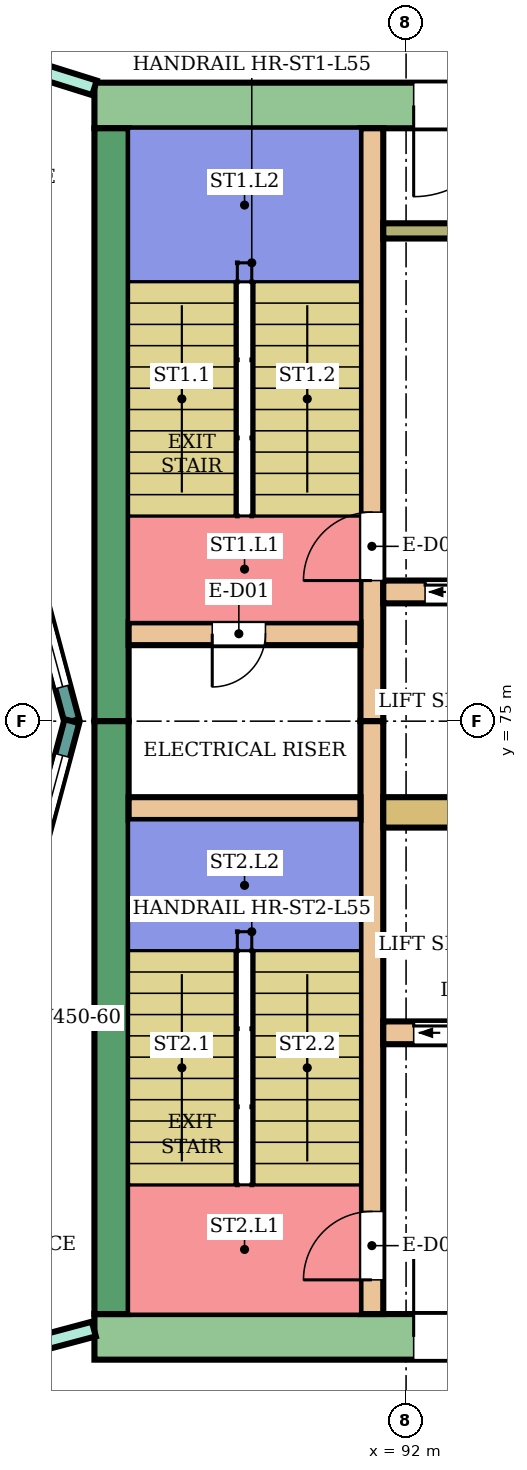
"""IFC4 building model, lengths in metres.
Left out: names, types, materials, properties, quantities, classifications, styles, units other than length and angle.
Written with IfcOpenShell. Run it as: python <this file> out.ifc"""

import sys

from ifc_helpers import new_model, si_unit, direction, frame, frame_2d, origin, place, context, subcontext, project, spatial, rectangle, extrude, element, fill, save


model = new_model("IFC4")
c1 = context("Model", 3, precision=1e-05, world=origin(), true_north=direction((0.0, 1.0)))
c2 = subcontext(c1, "Body", "Model", "MODEL_VIEW")
j1 = project(units=[si_unit("LENGTHUNIT", "METRE"), si_unit("PLANEANGLEUNIT", "RADIAN")], contexts=[c1])
p1 = place(None, origin())
s1 = spatial("IfcSite", under=j1, at=p1, CompositionType="ELEMENT")
p2 = place(p1, origin())
s2 = spatial("IfcBuilding", under=s1, at=p2, CompositionType="ELEMENT")
p3 = place(p2, frame((0.0, 0.0, 241.5)))
s3 = spatial("IfcBuildingStorey", under=s2, at=p3, CompositionType="ELEMENT", Elevation=241.5)
p4 = place(p3, frame((87.9, 83.1, 0.0), z_axis=(0.0, 0.0, 1.0), x_axis=(1.0, 0.0, 0.0)))
e1 = element("IfcWall", 1, at=p4, inside=s3, PredefinedType="SHEAR", context=c2, shape_type="SweptSolid", body=[
    extrude(rectangle(XDim=14.9, YDim=0.6, at=frame_2d((7.45, 0.0))), origin(), (0.0, 0.0, 1.0), 3.88),
])
p5 = place(p4, frame((4.2, 0.0, 0.0)))
e2 = element("IfcOpeningElement", 2, at=p5, cuts=e1, PredefinedType="OPENING", context=c2, shape_type="SweptSolid", body=[
    extrude(rectangle(XDim=2.4, YDim=2.4, at=frame_2d((1.2, 1.2))), frame((0.0, 0.31, 0.0), z_axis=(0.0, -1.0, 0.0), x_axis=(1.0, 0.0, 0.0)), (0.0, 0.0, 1.0), 0.62),
])
p6 = place(p3, frame((87.9, 66.9, 0.0), z_axis=(0.0, 0.0, 1.0), x_axis=(1.0, 0.0, 0.0)))
e3 = element("IfcWall", 3, at=p6, inside=s3, PredefinedType="SHEAR", context=c2, shape_type="SweptSolid", body=[
    extrude(rectangle(XDim=14.9, YDim=0.6, at=frame_2d((7.45, 0.0))), origin(), (0.0, 0.0, 1.0), 3.88),
])
p7 = place(p6, frame((4.2, 0.0, 0.0)))
e4 = element("IfcOpeningElement", 4, at=p7, cuts=e3, PredefinedType="OPENING", context=c2, shape_type="SweptSolid", body=[
    extrude(rectangle(XDim=2.4, YDim=2.4, at=frame_2d((1.2, 1.2))), frame((0.0, 0.31, 0.0), z_axis=(0.0, -1.0, 0.0), x_axis=(1.0, 0.0, 0.0)), (0.0, 0.0, 1.0), 0.62),
])
for number, where, z_axis, x_axis in (
    (5, (88.125, 75.0, 0.0), (0.0, 0.0, 1.0), (0.0, 1.0, 0.0)),
    (6, (88.125, 67.2, 0.0), (0.0, 0.0, 1.0), (0.0, 1.0, 0.0)),
):
    element("IfcWall", number, at=place(p3, frame(where, z_axis=z_axis, x_axis=x_axis)), inside=s3, PredefinedType="SHEAR", context=c2, shape_type="SweptSolid", body=[
        extrude(rectangle(XDim=7.8, YDim=0.45, at=frame_2d((3.9, 0.0))), origin(), (0.0, 0.0, 1.0), 3.88),
    ])
p8 = place(p3, frame((91.55, 75.0, 0.0), z_axis=(0.0, 0.0, 1.0), x_axis=(0.0, 1.0, 0.0)))
e7 = element("IfcWall", 7, at=p8, inside=s3, PredefinedType="SHEAR", context=c2, shape_type="SweptSolid", body=[
    extrude(rectangle(XDim=7.8, YDim=0.3, at=frame_2d((3.9, 0.0))), origin(), (0.0, 0.0, 1.0), 3.88),
])
p9 = place(p8, frame((1.85, 0.0, 0.0)))
e8 = element("IfcOpeningElement", 8, at=p9, cuts=e7, PredefinedType="OPENING", context=c2, shape_type="SweptSolid", body=[
    extrude(rectangle(XDim=0.9, YDim=2.1, at=frame_2d((0.45, 1.05))), frame((0.0, 0.16, 0.0), z_axis=(0.0, -1.0, 0.0), x_axis=(1.0, 0.0, 0.0)), (0.0, 0.0, 1.0), 0.32),
])
p10 = place(p3, frame((91.55, 67.2, 0.0), z_axis=(0.0, 0.0, 1.0), x_axis=(0.0, 1.0, 0.0)))
e9 = element("IfcWall", 9, at=p10, inside=s3, PredefinedType="SHEAR", context=c2, shape_type="SweptSolid", body=[
    extrude(rectangle(XDim=7.8, YDim=0.3, at=frame_2d((3.9, 0.0))), origin(), (0.0, 0.0, 1.0), 3.88),
])
p11 = place(p10, frame((0.45, 0.0, 0.0)))
e10 = element("IfcOpeningElement", 10, at=p11, cuts=e9, PredefinedType="OPENING", context=c2, shape_type="SweptSolid", body=[
    extrude(rectangle(XDim=0.9, YDim=2.1, at=frame_2d((0.45, 1.05))), frame((0.0, 0.16, 0.0), z_axis=(0.0, -1.0, 0.0), x_axis=(1.0, 0.0, 0.0)), (0.0, 0.0, 1.0), 0.32),
])
p12 = place(p3, frame((88.35, 76.15, 0.0), z_axis=(0.0, 0.0, 1.0), x_axis=(1.0, 0.0, 0.0)))
e11 = element("IfcWall", 11, at=p12, inside=s3, PredefinedType="SHEAR", context=c2, shape_type="SweptSolid", body=[
    extrude(rectangle(XDim=3.05, YDim=0.3, at=frame_2d((1.525, 0.0))), origin(), (0.0, 0.0, 1.0), 3.88),
])
p13 = place(p12, frame((1.1, 0.0, 0.0)))
e12 = element("IfcOpeningElement", 12, at=p13, cuts=e11, PredefinedType="OPENING", context=c2, shape_type="SweptSolid", body=[
    extrude(rectangle(XDim=0.7, YDim=2.0, at=frame_2d((0.35, 1.0))), frame((0.0, 0.16, 0.0), z_axis=(0.0, -1.0, 0.0), x_axis=(1.0, 0.0, 0.0)), (0.0, 0.0, 1.0), 0.32),
])
p14 = place(p3, frame((88.35, 73.85, 0.0), z_axis=(0.0, 0.0, 1.0), x_axis=(1.0, 0.0, 0.0)))
e13 = element("IfcWall", 13, at=p14, inside=s3, PredefinedType="SHEAR", context=c2, shape_type="SweptSolid", body=[
    extrude(rectangle(XDim=3.05, YDim=0.3, at=frame_2d((1.525, 0.0))), origin(), (0.0, 0.0, 1.0), 3.88),
])
p15 = place(p3, frame((91.7, 76.7, 0.0), z_axis=(0.0, 0.0, 1.0), x_axis=(1.0, 0.0, 0.0)))
e14 = element("IfcWall", 14, at=p15, inside=s3, PredefinedType="SHEAR", context=c2, shape_type="SweptSolid", body=[
    extrude(rectangle(XDim=11.1, YDim=0.3, at=frame_2d((5.55, 0.0))), origin(), (0.0, 0.0, 1.0), 3.88),
])
p16 = place(p15, frame((0.55, 0.0, 0.0)))
e15 = element("IfcOpeningElement", 15, at=p16, cuts=e14, PredefinedType="OPENING", context=c2, shape_type="SweptSolid", body=[
    extrude(rectangle(XDim=1.1, YDim=2.1, at=frame_2d((0.55, 1.05))), frame((0.0, 0.16, 0.0), z_axis=(0.0, -1.0, 0.0), x_axis=(1.0, 0.0, 0.0)), (0.0, 0.0, 1.0), 0.32),
])
p17 = place(p15, frame((3.0, 0.0, 0.0)))
e16 = element("IfcOpeningElement", 16, at=p17, cuts=e14, PredefinedType="OPENING", context=c2, shape_type="SweptSolid", body=[
    extrude(rectangle(XDim=1.2, YDim=2.1, at=frame_2d((0.6, 1.05))), frame((0.0, 0.16, 0.0), z_axis=(0.0, -1.0, 0.0), x_axis=(1.0, 0.0, 0.0)), (0.0, 0.0, 1.0), 0.32),
])
p18 = place(p15, frame((5.5, 0.0, 0.0)))
e17 = element("IfcOpeningElement", 17, at=p18, cuts=e14, PredefinedType="OPENING", context=c2, shape_type="SweptSolid", body=[
    extrude(rectangle(XDim=1.2, YDim=2.1, at=frame_2d((0.6, 1.05))), frame((0.0, 0.16, 0.0), z_axis=(0.0, -1.0, 0.0), x_axis=(1.0, 0.0, 0.0)), (0.0, 0.0, 1.0), 0.32),
])
p19 = place(p15, frame((7.95, 0.0, 0.0)))
e18 = element("IfcOpeningElement", 18, at=p19, cuts=e14, PredefinedType="OPENING", context=c2, shape_type="SweptSolid", body=[
    extrude(rectangle(XDim=0.9, YDim=2.1, at=frame_2d((0.45, 1.05))), frame((0.0, 0.16, 0.0), z_axis=(0.0, -1.0, 0.0), x_axis=(1.0, 0.0, 0.0)), (0.0, 0.0, 1.0), 0.32),
])
p20 = place(p15, frame((9.75, 0.0, 0.0)))
e19 = element("IfcOpeningElement", 19, at=p20, cuts=e14, PredefinedType="OPENING", context=c2, shape_type="SweptSolid", body=[
    extrude(rectangle(XDim=0.9, YDim=2.1, at=frame_2d((0.45, 1.05))), frame((0.0, 0.16, 0.0), z_axis=(0.0, -1.0, 0.0), x_axis=(1.0, 0.0, 0.0)), (0.0, 0.0, 1.0), 0.32),
])
p21 = place(p3, frame((91.7, 73.8, 0.0), z_axis=(0.0, 0.0, 1.0), x_axis=(1.0, 0.0, 0.0)))
e20 = element("IfcWall", 20, at=p21, inside=s3, PredefinedType="SHEAR", context=c2, shape_type="SweptSolid", body=[
    extrude(rectangle(XDim=11.1, YDim=0.4, at=frame_2d((5.55, 0.0))), origin(), (0.0, 0.0, 1.0), 3.88),
])
p22 = place(p3, frame((91.7, 70.9, 0.0), z_axis=(0.0, 0.0, 1.0), x_axis=(1.0, 0.0, 0.0)))
e21 = element("IfcWall", 21, at=p22, inside=s3, PredefinedType="SHEAR", context=c2, shape_type="SweptSolid", body=[
    extrude(rectangle(XDim=11.1, YDim=0.3, at=frame_2d((5.55, 0.0))), origin(), (0.0, 0.0, 1.0), 3.88),
])
p23 = place(p22, frame((0.4, 0.0, 0.0)))
e22 = element("IfcOpeningElement", 22, at=p23, cuts=e21, PredefinedType="OPENING", context=c2, shape_type="SweptSolid", body=[
    extrude(rectangle(XDim=1.4, YDim=2.1, at=frame_2d((0.7, 1.05))), frame((0.0, 0.16, 0.0), z_axis=(0.0, -1.0, 0.0), x_axis=(1.0, 0.0, 0.0)), (0.0, 0.0, 1.0), 0.32),
])
p24 = place(p22, frame((3.0, 0.0, 0.0)))
e23 = element("IfcOpeningElement", 23, at=p24, cuts=e21, PredefinedType="OPENING", context=c2, shape_type="SweptSolid", body=[
    extrude(rectangle(XDim=1.2, YDim=2.1, at=frame_2d((0.6, 1.05))), frame((0.0, 0.16, 0.0), z_axis=(0.0, -1.0, 0.0), x_axis=(1.0, 0.0, 0.0)), (0.0, 0.0, 1.0), 0.32),
])
p25 = place(p22, frame((6.075, 0.0, 0.0)))
e24 = element("IfcOpeningElement", 24, at=p25, cuts=e21, PredefinedType="OPENING", context=c2, shape_type="SweptSolid", body=[
    extrude(rectangle(XDim=0.9, YDim=2.1, at=frame_2d((0.45, 1.05))), frame((0.0, 0.16, 0.0), z_axis=(0.0, -1.0, 0.0), x_axis=(1.0, 0.0, 0.0)), (0.0, 0.0, 1.0), 0.32),
])
p26 = place(p22, frame((9.125, 0.0, 0.0)))
e25 = element("IfcOpeningElement", 25, at=p26, cuts=e21, PredefinedType="OPENING", context=c2, shape_type="SweptSolid", body=[
    extrude(rectangle(XDim=0.9, YDim=2.1, at=frame_2d((0.45, 1.05))), frame((0.0, 0.16, 0.0), z_axis=(0.0, -1.0, 0.0), x_axis=(1.0, 0.0, 0.0)), (0.0, 0.0, 1.0), 0.32),
])
p27 = place(p3, frame((91.7, 81.45, 0.0), z_axis=(0.0, 0.0, 1.0), x_axis=(1.0, 0.0, 0.0)))
e26 = element("IfcWall", 26, at=p27, inside=s3, PredefinedType="SHEAR", context=c2, shape_type="SweptSolid", body=[
    extrude(rectangle(XDim=4.35, YDim=0.2, at=frame_2d((2.175, 0.0))), origin(), (0.0, 0.0, 1.0), 3.88),
])
p28 = place(p3, frame((87.604, 75.0, 0.0), z_axis=(0.0, 0.0, 1.0), x_axis=(-0.258789828301, 0.965933654434, 0.0)))
e27 = element("IfcWall", 27, at=p28, inside=s3, PredefinedType="NOTDEFINED", context=c2, shape_type="SweptSolid", body=[
    extrude(rectangle(XDim=3.936, YDim=0.2, at=frame_2d((1.968, 0.0))), origin(), (0.0, 0.0, 1.0), 4.2),
])
p29 = place(p28, frame((0.468, 0.0, 0.9)))
e28 = element("IfcOpeningElement", 28, at=p29, cuts=e27, PredefinedType="OPENING", context=c2, shape_type="SweptSolid", body=[
    extrude(rectangle(XDim=3.0, YDim=2.3, at=frame_2d((1.5, 1.15))), frame((0.0, 0.11, 0.0), z_axis=(0.0, -1.0, 0.0), x_axis=(1.0, 0.0, 0.0)), (0.0, 0.0, 1.0), 0.22),
])
p30 = place(p3, frame((86.585, 71.198, 0.0), z_axis=(0.0, 0.0, 1.0), x_axis=(0.258789828301, 0.965933654434, 0.0)))
e29 = element("IfcWall", 29, at=p30, inside=s3, PredefinedType="NOTDEFINED", context=c2, shape_type="SweptSolid", body=[
    extrude(rectangle(XDim=3.936, YDim=0.2, at=frame_2d((1.968, 0.0))), origin(), (0.0, 0.0, 1.0), 4.2),
])
p31 = place(p30, frame((0.468, 0.0, 0.9)))
e30 = element("IfcOpeningElement", 30, at=p31, cuts=e29, PredefinedType="OPENING", context=c2, shape_type="SweptSolid", body=[
    extrude(rectangle(XDim=3.0, YDim=2.3, at=frame_2d((1.5, 1.15))), frame((0.0, 0.11, 0.0), z_axis=(0.0, -1.0, 0.0), x_axis=(1.0, 0.0, 0.0)), (0.0, 0.0, 1.0), 0.22),
])
p32 = place(p3, frame((80.125, 64.932, 0.0), z_axis=(0.0, 0.0, 1.0), x_axis=(0.966236955806, 0.257655089674, 0.0)))
e31 = element("IfcWall", 31, at=p32, inside=s3, PredefinedType="PARTITIONING", context=c2, shape_type="SweptSolid", body=[
    extrude(rectangle(XDim=8.039, YDim=0.2, at=frame_2d((4.02, 0.0))), origin(), (0.0, 0.0, 1.0), 3.75),
])
p33 = place(p32, frame((6.298, 0.0, 0.0)))
e32 = element("IfcOpeningElement", 32, at=p33, cuts=e31, PredefinedType="OPENING", context=c2, shape_type="SweptSolid", body=[
    extrude(rectangle(XDim=0.9, YDim=2.1, at=frame_2d((0.45, 1.05))), frame((0.0, 0.11, 0.0), z_axis=(0.0, -1.0, 0.0), x_axis=(1.0, 0.0, 0.0)), (0.0, 0.0, 1.0), 0.22),
])
p34 = place(p32, frame((2.045, 0.0, 0.0)))
e33 = element("IfcOpeningElement", 33, at=p34, cuts=e31, PredefinedType="OPENING", context=c2, shape_type="SweptSolid", body=[
    extrude(rectangle(XDim=0.9, YDim=2.1, at=frame_2d((0.45, 1.05))), frame((0.0, 0.11, 0.0), z_axis=(0.0, -1.0, 0.0), x_axis=(1.0, 0.0, 0.0)), (0.0, 0.0, 1.0), 0.22),
])
p35 = place(p3, frame((85.587, 84.057, 0.0), z_axis=(0.0, 0.0, 1.0), x_axis=(0.954239513179, -0.299043393987, 0.0)))
e34 = element("IfcWall", 34, at=p35, inside=s3, PredefinedType="PARTITIONING", context=c2, shape_type="SweptSolid", body=[
    extrude(rectangle(XDim=2.424, YDim=0.2, at=frame_2d((1.212, 0.0))), origin(), (0.0, 0.0, 1.0), 3.75),
])
p36 = place(p35, frame((0.762, 0.0, 0.0)))
e35 = element("IfcOpeningElement", 35, at=p36, cuts=e34, PredefinedType="OPENING", context=c2, shape_type="SweptSolid", body=[
    extrude(rectangle(XDim=0.9, YDim=2.1, at=frame_2d((0.45, 1.05))), frame((0.0, 0.11, 0.0), z_axis=(0.0, -1.0, 0.0), x_axis=(1.0, 0.0, 0.0)), (0.0, 0.0, 1.0), 0.22),
])
p37 = place(p29, origin())
e36 = element("IfcWindow", 36, at=p37, inside=s3, PartitioningType="SINGLE_PANEL", PredefinedType="WINDOW", context=c2, shape_type="SweptSolid", body=[
    extrude(rectangle(XDim=3.0, YDim=2.3, at=frame_2d((1.5, 1.15))), frame((0.0, 0.03, 0.0), z_axis=(0.0, -1.0, 0.0), x_axis=(1.0, 0.0, 0.0)), (0.0, 0.0, 1.0), 0.06),
])
fill(e28, e36)
p38 = place(p31, origin())
e37 = element("IfcWindow", 37, at=p38, inside=s3, PartitioningType="SINGLE_PANEL", PredefinedType="WINDOW", context=c2, shape_type="SweptSolid", body=[
    extrude(rectangle(XDim=3.0, YDim=2.3, at=frame_2d((1.5, 1.15))), frame((0.0, 0.03, 0.0), z_axis=(0.0, -1.0, 0.0), x_axis=(1.0, 0.0, 0.0)), (0.0, 0.0, 1.0), 0.06),
])
fill(e30, e37)
p39 = place(p13, frame((0.7, 0.0, 0.0), z_axis=(0.0, 0.0, 1.0), x_axis=(-1.0, 0.0, 0.0)))
e38 = element("IfcDoor", 38, at=p39, inside=s3, OperationType="SINGLE_SWING_RIGHT", PredefinedType="DOOR", context=c2, shape_type="SweptSolid", body=[
    extrude(rectangle(XDim=0.7, YDim=2.0, at=frame_2d((0.35, 1.0))), frame((0.0, 0.025, 0.0), z_axis=(0.0, -1.0, 0.0), x_axis=(1.0, 0.0, 0.0)), (0.0, 0.0, 1.0), 0.05),
])
fill(e12, e38)
p40 = place(p9, origin())
e39 = element("IfcDoor", 39, at=p40, inside=s3, OperationType="SINGLE_SWING_LEFT", PredefinedType="DOOR", context=c2, shape_type="SweptSolid", body=[
    extrude(rectangle(XDim=0.9, YDim=2.1, at=frame_2d((0.45, 1.05))), frame((0.0, 0.025, 0.0), z_axis=(0.0, -1.0, 0.0), x_axis=(1.0, 0.0, 0.0)), (0.0, 0.0, 1.0), 0.05),
])
fill(e8, e39)
p41 = place(p11, origin())
e40 = element("IfcDoor", 40, at=p41, inside=s3, OperationType="SINGLE_SWING_LEFT", PredefinedType="DOOR", context=c2, shape_type="SweptSolid", body=[
    extrude(rectangle(XDim=0.9, YDim=2.1, at=frame_2d((0.45, 1.05))), frame((0.0, 0.025, 0.0), z_axis=(0.0, -1.0, 0.0), x_axis=(1.0, 0.0, 0.0)), (0.0, 0.0, 1.0), 0.05),
])
fill(e10, e40)
p42 = place(p16, origin())
e41 = element("IfcDoor", 41, at=p42, inside=s3, OperationType="DOUBLE_DOOR_SLIDING", PredefinedType="DOOR", context=c2, shape_type="SweptSolid", body=[
    extrude(rectangle(XDim=1.1, YDim=2.1, at=frame_2d((0.55, 1.05))), frame((0.0, 0.025, 0.0), z_axis=(0.0, -1.0, 0.0), x_axis=(1.0, 0.0, 0.0)), (0.0, 0.0, 1.0), 0.05),
])
fill(e15, e41)
p43 = place(p23, origin())
e42 = element("IfcDoor", 42, at=p43, inside=s3, OperationType="DOUBLE_DOOR_SLIDING", PredefinedType="DOOR", context=c2, shape_type="SweptSolid", body=[
    extrude(rectangle(XDim=1.4, YDim=2.1, at=frame_2d((0.7, 1.05))), frame((0.0, 0.025, 0.0), z_axis=(0.0, -1.0, 0.0), x_axis=(1.0, 0.0, 0.0)), (0.0, 0.0, 1.0), 0.05),
])
fill(e22, e42)
p44 = place(p5, frame((2.4, 0.0, 0.0), z_axis=(0.0, 0.0, 1.0), x_axis=(-1.0, 0.0, 0.0)))
e43 = element("IfcDoor", 43, at=p44, inside=s3, OperationType="DOUBLE_DOOR_SINGLE_SWING", PredefinedType="DOOR", context=c2, shape_type="SweptSolid", body=[
    extrude(rectangle(XDim=2.4, YDim=2.4, at=frame_2d((1.2, 1.2))), frame((0.0, 0.025, 0.0), z_axis=(0.0, -1.0, 0.0), x_axis=(1.0, 0.0, 0.0)), (0.0, 0.0, 1.0), 0.05),
])
fill(e2, e43)
p45 = place(p7, origin())
e44 = element("IfcDoor", 44, at=p45, inside=s3, OperationType="DOUBLE_DOOR_SINGLE_SWING", PredefinedType="DOOR", context=c2, shape_type="SweptSolid", body=[
    extrude(rectangle(XDim=2.4, YDim=2.4, at=frame_2d((1.2, 1.2))), frame((0.0, 0.025, 0.0), z_axis=(0.0, -1.0, 0.0), x_axis=(1.0, 0.0, 0.0)), (0.0, 0.0, 1.0), 0.05),
])
fill(e4, e44)
save(model, sys.argv[1])
